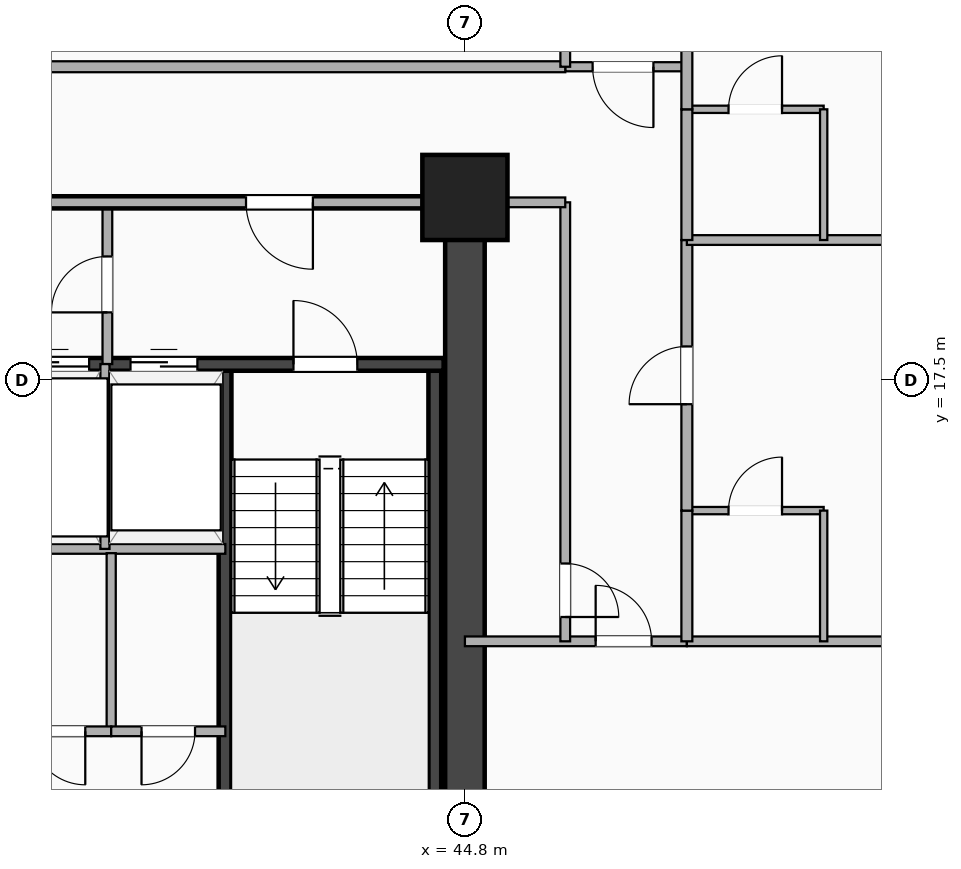
"""IFC4 building model, lengths in metres.
Left out: names, types, materials, properties, quantities, classifications, styles, units other than length and angle.
Written with IfcOpenShell. Run it as: python <this file> out.ifc"""

import sys

from ifc_helpers import new_model, si_unit, direction, frame, frame_2d, origin, origin_2d, place, context, subcontext, project, spatial, rectangle, extrude, element, fill, save


model = new_model("IFC4")
c1 = context("Model", 3, precision=1e-05, world=origin(), true_north=direction((0.0, 1.0)))
c2 = subcontext(c1, "Body", "Model", "MODEL_VIEW")
j1 = project(units=[si_unit("LENGTHUNIT", "METRE"), si_unit("PLANEANGLEUNIT", "RADIAN")], contexts=[c1])
p1 = place(None, origin())
s1 = spatial("IfcSite", under=j1, at=p1, CompositionType="ELEMENT")
p2 = place(p1, origin())
s2 = spatial("IfcBuilding", under=s1, at=p2, CompositionType="ELEMENT")
p3 = place(p2, frame((0.0, 0.0, 64.9)))
s3 = spatial("IfcBuildingStorey", under=s2, at=p3, CompositionType="ELEMENT", Elevation=64.9)
p4 = place(p3, frame((44.8, 3.5, 0.0), z_axis=(0.0, 0.0, 1.0), x_axis=(0.0, 1.0, 0.0)))
e1 = element("IfcWall", 1, at=p4, inside=s3, PredefinedType="SHEAR", context=c2, shape_type="SweptSolid", body=[
    extrude(rectangle(XDim=16.9, YDim=0.65, at=frame_2d((8.45, 0.0))), origin(), (0.0, 0.0, 1.0), 3.22),
])
for number, where, z_axis, x_axis in (
    (2, (40.855, 9.745, 0.0), (0.0, 0.0, 1.0), (0.0, 1.0, 0.0)),
    (3, (44.305, 9.745, 0.0), (0.0, 0.0, 1.0), (0.0, 1.0, 0.0)),
):
    element("IfcWall", number, at=place(p3, frame(where, z_axis=z_axis, x_axis=x_axis)), inside=s3, PredefinedType="SHEAR", context=c2, shape_type="SweptSolid", body=[
        extrude(rectangle(XDim=8.01, YDim=0.21, at=frame_2d((4.005, 0.0))), origin(), (0.0, 0.0, 1.0), 3.22),
    ])
p5 = place(p3, frame((37.25, 17.755, 0.0), z_axis=(0.0, 0.0, 1.0), x_axis=(1.0, 0.0, 0.0)))
e4 = element("IfcWall", 4, at=p5, inside=s3, PredefinedType="SHEAR", context=c2, shape_type="SweptSolid", body=[
    extrude(rectangle(XDim=7.2, YDim=0.21, at=frame_2d((3.6, 0.0))), origin(), (0.0, 0.0, 1.0), 3.22),
])
p6 = place(p5, frame((0.25, 0.0, 0.0)))
e5 = element("IfcOpeningElement", 5, at=p6, cuts=e4, PredefinedType="OPENING", context=c2, shape_type="SweptSolid", body=[
    extrude(rectangle(XDim=1.12, YDim=2.2, at=frame_2d((0.56, 1.1))), frame((0.0, 0.115, 0.0), z_axis=(0.0, -1.0, 0.0), x_axis=(1.0, 0.0, 0.0)), (0.0, 0.0, 1.0), 0.23),
])
p7 = place(p5, frame((2.05, 0.0, 0.0)))
e6 = element("IfcOpeningElement", 6, at=p7, cuts=e4, PredefinedType="OPENING", context=c2, shape_type="SweptSolid", body=[
    extrude(rectangle(XDim=1.1, YDim=2.18, at=frame_2d((0.55, 1.09))), frame((0.0, 0.115, 0.0), z_axis=(0.0, -1.0, 0.0), x_axis=(1.0, 0.0, 0.0)), (0.0, 0.0, 1.0), 0.23),
])
p8 = place(p5, frame((5.78, 0.0, 0.0), z_axis=(0.0, 0.0, 1.0), x_axis=(-1.0, 0.0, 0.0)))
e7 = element("IfcOpeningElement", 7, at=p8, cuts=e4, PredefinedType="OPENING", context=c2, shape_type="SweptSolid", body=[
    extrude(rectangle(XDim=1.05, YDim=2.15, at=frame_2d((0.525, 1.075))), frame((0.0, 0.115, 0.0), z_axis=(0.0, -1.0, 0.0), x_axis=(1.0, 0.0, 0.0)), (0.0, 0.0, 1.0), 0.23),
])
p9 = place(p3, frame((44.8, 20.5, -0.28), z_axis=(0.0, 0.0, 1.0), x_axis=(1.0, 0.0, 0.0)))
e8 = element("IfcColumn", 8, at=p9, inside=s3, PredefinedType="COLUMN", context=c2, shape_type="SweptSolid", body=[
    extrude(rectangle(XDim=1.4, YDim=1.4, at=origin_2d()), origin(), (0.0, 0.0, 1.0), 3.5),
])
p10 = place(p3, frame((38.92, 17.76, 0.0), z_axis=(0.0, 0.0, 1.0), x_axis=(0.0, 1.0, 0.0)))
e9 = element("IfcWall", 9, at=p10, inside=s3, PredefinedType="PARTITIONING", context=c2, shape_type="SweptSolid", body=[
    extrude(rectangle(XDim=2.66, YDim=0.16, at=frame_2d((1.33, 0.0))), origin(), (0.0, 0.0, 1.0), 2.51),
])
p11 = place(p10, frame((1.77, 0.0, 0.0), z_axis=(0.0, 0.0, 1.0), x_axis=(-1.0, 0.0, 0.0)))
e10 = element("IfcOpeningElement", 10, at=p11, cuts=e9, PredefinedType="OPENING", context=c2, shape_type="SweptSolid", body=[
    extrude(rectangle(XDim=0.92, YDim=2.08, at=frame_2d((0.46, 1.04))), frame((0.0, 0.09, 0.0), z_axis=(0.0, -1.0, 0.0), x_axis=(1.0, 0.0, 0.0)), (0.0, 0.0, 1.0), 0.18),
])
p12 = place(p3, frame((37.25, 14.72, 0.0), z_axis=(0.0, 0.0, 1.0), x_axis=(1.0, 0.0, 0.0)))
e11 = element("IfcWall", 11, at=p12, inside=s3, PredefinedType="PARTITIONING", context=c2, shape_type="SweptSolid", body=[
    extrude(rectangle(XDim=3.61, YDim=0.16, at=frame_2d((1.805, 0.0))), origin(), (0.0, 0.0, 1.0), 3.22),
])
p13 = place(p3, frame((38.88, 14.72, 0.0), z_axis=(0.0, 0.0, 1.0), x_axis=(0.0, 1.0, 0.0)))
e12 = element("IfcWall", 12, at=p13, inside=s3, PredefinedType="PARTITIONING", context=c2, shape_type="SweptSolid", body=[
    extrude(rectangle(XDim=3.04, YDim=0.15, at=frame_2d((1.52, 0.0))), origin(), (0.0, 0.0, 1.0), 3.22),
])
p14 = place(p3, frame((37.0, 20.42, 0.0), z_axis=(0.0, 0.0, 1.0), x_axis=(1.0, 0.0, 0.0)))
e13 = element("IfcWall", 13, at=p14, inside=s3, PredefinedType="PARTITIONING", context=c2, shape_type="SweptSolid", body=[
    extrude(rectangle(XDim=7.45, YDim=0.2, at=frame_2d((3.725, 0.0))), origin(), (0.0, 0.0, 1.0), 2.51),
])
p15 = place(p14, frame((4.2, 0.0, 0.0)))
e14 = element("IfcOpeningElement", 14, at=p15, cuts=e13, PredefinedType="OPENING", context=c2, shape_type="SweptSolid", body=[
    extrude(rectangle(XDim=1.1, YDim=2.15, at=frame_2d((0.55, 1.075))), frame((0.0, 0.11, 0.0), z_axis=(0.0, -1.0, 0.0), x_axis=(1.0, 0.0, 0.0)), (0.0, 0.0, 1.0), 0.22),
])
p16 = place(p3, frame((38.983, 11.72, 0.0), z_axis=(0.0, 0.0, 1.0), x_axis=(0.0, 1.0, 0.0)))
e15 = element("IfcWall", 15, at=p16, inside=s3, PredefinedType="PARTITIONING", context=c2, shape_type="SweptSolid", body=[
    extrude(rectangle(XDim=2.93, YDim=0.15, at=frame_2d((1.465, 0.0))), origin(), (0.0, 0.0, 1.0), 3.22),
])
p17 = place(p3, frame((37.25, 11.72, 0.0), z_axis=(0.0, 0.0, 1.0), x_axis=(1.0, 0.0, 0.0)))
e16 = element("IfcWall", 16, at=p17, inside=s3, PredefinedType="PARTITIONING", context=c2, shape_type="SweptSolid", body=[
    extrude(rectangle(XDim=1.733, YDim=0.16, at=frame_2d((0.866, 0.0))), origin(), (0.0, 0.0, 1.0), 3.22),
])
p18 = place(p17, frame((0.427, 0.0, 0.0)))
e17 = element("IfcOpeningElement", 17, at=p18, cuts=e16, PredefinedType="OPENING", context=c2, shape_type="SweptSolid", body=[
    extrude(rectangle(XDim=0.88, YDim=2.08, at=frame_2d((0.44, 1.04))), frame((0.0, 0.09, 0.0), z_axis=(0.0, -1.0, 0.0), x_axis=(1.0, 0.0, 0.0)), (0.0, 0.0, 1.0), 0.18),
])
p19 = place(p3, frame((38.983, 11.72, 0.0), z_axis=(0.0, 0.0, 1.0), x_axis=(1.0, 0.0, 0.0)))
e18 = element("IfcWall", 18, at=p19, inside=s3, PredefinedType="PARTITIONING", context=c2, shape_type="SweptSolid", body=[
    extrude(rectangle(XDim=1.877, YDim=0.16, at=frame_2d((0.938, 0.0))), origin(), (0.0, 0.0, 1.0), 3.22),
])
p20 = place(p19, frame((0.499, 0.0, 0.0)))
e19 = element("IfcOpeningElement", 19, at=p20, cuts=e18, PredefinedType="OPENING", context=c2, shape_type="SweptSolid", body=[
    extrude(rectangle(XDim=0.88, YDim=2.08, at=frame_2d((0.44, 1.04))), frame((0.0, 0.09, 0.0), z_axis=(0.0, -1.0, 0.0), x_axis=(1.0, 0.0, 0.0)), (0.0, 0.0, 1.0), 0.18),
])
p21 = place(p3, frame((44.8, 13.2, 0.0), z_axis=(0.0, 0.0, 1.0), x_axis=(1.0, 0.0, 0.0)))
e20 = element("IfcWall", 20, at=p21, inside=s3, PredefinedType="PARTITIONING", context=c2, shape_type="SweptSolid", body=[
    extrude(rectangle(XDim=3.65, YDim=0.16, at=frame_2d((1.825, 0.0))), origin(), (0.0, 0.0, 1.0), 2.51),
])
p22 = place(p21, frame((3.07, 0.0, 0.0), z_axis=(0.0, 0.0, 1.0), x_axis=(-1.0, 0.0, 0.0)))
e21 = element("IfcOpeningElement", 21, at=p22, cuts=e20, PredefinedType="OPENING", context=c2, shape_type="SweptSolid", body=[
    extrude(rectangle(XDim=0.92, YDim=2.08, at=frame_2d((0.46, 1.04))), frame((0.0, 0.09, 0.0), z_axis=(0.0, -1.0, 0.0), x_axis=(1.0, 0.0, 0.0)), (0.0, 0.0, 1.0), 0.18),
])
p23 = place(p3, frame((46.45, 13.2, 0.0), z_axis=(0.0, 0.0, 1.0), x_axis=(0.0, 1.0, 0.0)))
e22 = element("IfcWall", 22, at=p23, inside=s3, PredefinedType="PARTITIONING", context=c2, shape_type="SweptSolid", body=[
    extrude(rectangle(XDim=7.22, YDim=0.16, at=frame_2d((3.61, 0.0))), origin(), (0.0, 0.0, 1.0), 2.51),
])
p24 = place(p23, frame((0.4, 0.0, 0.0)))
e23 = element("IfcOpeningElement", 23, at=p24, cuts=e22, PredefinedType="OPENING", context=c2, shape_type="SweptSolid", body=[
    extrude(rectangle(XDim=0.88, YDim=2.08, at=frame_2d((0.44, 1.04))), frame((0.0, 0.09, 0.0), z_axis=(0.0, -1.0, 0.0), x_axis=(1.0, 0.0, 0.0)), (0.0, 0.0, 1.0), 0.18),
])
p25 = place(p3, frame((44.8, 20.42, 0.0), z_axis=(0.0, 0.0, 1.0), x_axis=(1.0, 0.0, 0.0)))
e24 = element("IfcWall", 24, at=p25, inside=s3, PredefinedType="PARTITIONING", context=c2, shape_type="SweptSolid", body=[
    extrude(rectangle(XDim=1.65, YDim=0.16, at=frame_2d((0.825, 0.0))), origin(), (0.0, 0.0, 1.0), 2.51),
])
p26 = place(p3, frame((46.45, 22.65, 0.0), z_axis=(0.0, 0.0, 1.0), x_axis=(1.0, 0.0, 0.0)))
e25 = element("IfcWall", 25, at=p26, inside=s3, PredefinedType="PARTITIONING", context=c2, shape_type="SweptSolid", body=[
    extrude(rectangle(XDim=2.0, YDim=0.15, at=frame_2d((1.0, 0.0))), origin(), (0.0, 0.0, 1.0), 3.22),
])
p27 = place(p26, frame((0.45, 0.0, 0.0)))
e26 = element("IfcOpeningElement", 26, at=p27, cuts=e25, PredefinedType="OPENING", context=c2, shape_type="SweptSolid", body=[
    extrude(rectangle(XDim=1.0, YDim=2.15, at=frame_2d((0.5, 1.075))), frame((0.0, 0.085, 0.0), z_axis=(0.0, -1.0, 0.0), x_axis=(1.0, 0.0, 0.0)), (0.0, 0.0, 1.0), 0.17),
])
p28 = place(p3, frame((24.1, 22.65, 0.0), z_axis=(0.0, 0.0, 1.0), x_axis=(1.0, 0.0, 0.0)))
e27 = element("IfcWall", 27, at=p28, inside=s3, PredefinedType="PARTITIONING", context=c2, shape_type="SweptSolid", body=[
    extrude(rectangle(XDim=22.35, YDim=0.18, at=frame_2d((11.175, 0.0))), origin(), (0.0, 0.0, 1.0), 2.51),
])
p29 = place(p28, frame((10.7, 0.0, 0.0)))
e28 = element("IfcOpeningElement", 28, at=p29, cuts=e27, PredefinedType="OPENING", context=c2, shape_type="SweptSolid", body=[
    extrude(rectangle(XDim=0.95, YDim=2.15, at=frame_2d((0.475, 1.075))), frame((0.0, 0.1, 0.0), z_axis=(0.0, -1.0, 0.0), x_axis=(1.0, 0.0, 0.0)), (0.0, 0.0, 1.0), 0.2),
])
p30 = place(p3, frame((46.45, 22.65, 0.0), z_axis=(0.0, 0.0, 1.0), x_axis=(0.0, 1.0, 0.0)))
e29 = element("IfcWall", 29, at=p30, inside=s3, PredefinedType="PARTITIONING", context=c2, shape_type="SweptSolid", body=[
    extrude(rectangle(XDim=10.35, YDim=0.16, at=frame_2d((5.175, 0.0))), origin(), (0.0, 0.0, 1.0), 2.51),
])
p31 = place(p3, frame((48.45, 13.2, 0.0), z_axis=(0.0, 0.0, 1.0), x_axis=(1.0, 0.0, 0.0)))
e30 = element("IfcWall", 30, at=p31, inside=s3, PredefinedType="PARTITIONING", context=c2, shape_type="SweptSolid", body=[
    extrude(rectangle(XDim=13.23, YDim=0.16, at=frame_2d((6.615, 0.0))), origin(), (0.0, 0.0, 1.0), 2.583),
])
p32 = place(p3, frame((48.45, 15.35, 0.0), z_axis=(0.0, 0.0, 1.0), x_axis=(1.0, 0.0, 0.0)))
e31 = element("IfcWall", 31, at=p32, inside=s3, PredefinedType="PARTITIONING", context=c2, shape_type="SweptSolid", body=[
    extrude(rectangle(XDim=2.25, YDim=0.12, at=frame_2d((1.125, 0.0))), origin(), (0.0, 0.0, 1.0), 3.22),
])
p33 = place(p32, frame((1.565, 0.0, 0.0), z_axis=(0.0, 0.0, 1.0), x_axis=(-1.0, 0.0, 0.0)))
e32 = element("IfcOpeningElement", 32, at=p33, cuts=e31, PredefinedType="OPENING", context=c2, shape_type="SweptSolid", body=[
    extrude(rectangle(XDim=0.88, YDim=2.08, at=frame_2d((0.44, 1.04))), frame((0.0, 0.07, 0.0), z_axis=(0.0, -1.0, 0.0), x_axis=(1.0, 0.0, 0.0)), (0.0, 0.0, 1.0), 0.14),
])
p34 = place(p3, frame((50.7, 13.2, 0.0), z_axis=(0.0, 0.0, 1.0), x_axis=(0.0, 1.0, 0.0)))
e33 = element("IfcWall", 33, at=p34, inside=s3, PredefinedType="PARTITIONING", context=c2, shape_type="SweptSolid", body=[
    extrude(rectangle(XDim=2.15, YDim=0.12, at=frame_2d((1.075, 0.0))), origin(), (0.0, 0.0, 1.0), 2.902),
])
p35 = place(p3, frame((48.45, 13.2, 0.0), z_axis=(0.0, 0.0, 1.0), x_axis=(0.0, 1.0, 0.0)))
e34 = element("IfcWall", 34, at=p35, inside=s3, PredefinedType="PARTITIONING", context=c2, shape_type="SweptSolid", body=[
    extrude(rectangle(XDim=2.15, YDim=0.18, at=frame_2d((1.075, 0.0))), origin(), (0.0, 0.0, 1.0), 2.902),
])
p36 = place(p3, frame((48.45, 15.35, 0.0), z_axis=(0.0, 0.0, 1.0), x_axis=(0.0, 1.0, 0.0)))
e35 = element("IfcWall", 35, at=p36, inside=s3, PredefinedType="PARTITIONING", context=c2, shape_type="SweptSolid", body=[
    extrude(rectangle(XDim=4.45, YDim=0.18, at=frame_2d((2.225, 0.0))), origin(), (0.0, 0.0, 1.0), 2.902),
])
p37 = place(p36, frame((2.7, 0.0, 0.0), z_axis=(0.0, 0.0, 1.0), x_axis=(-1.0, 0.0, 0.0)))
e36 = element("IfcOpeningElement", 36, at=p37, cuts=e35, PredefinedType="OPENING", context=c2, shape_type="SweptSolid", body=[
    extrude(rectangle(XDim=0.95, YDim=2.15, at=frame_2d((0.475, 1.075))), frame((0.0, 0.1, 0.0), z_axis=(0.0, -1.0, 0.0), x_axis=(1.0, 0.0, 0.0)), (0.0, 0.0, 1.0), 0.2),
])
p38 = place(p3, frame((48.45, 19.8, 0.0), z_axis=(0.0, 0.0, 1.0), x_axis=(1.0, 0.0, 0.0)))
e37 = element("IfcWall", 37, at=p38, inside=s3, PredefinedType="PARTITIONING", context=c2, shape_type="SweptSolid", body=[
    extrude(rectangle(XDim=13.23, YDim=0.16, at=frame_2d((6.615, 0.0))), origin(), (0.0, 0.0, 1.0), 2.583),
])
p39 = place(p3, frame((48.45, 21.95, 0.0), z_axis=(0.0, 0.0, 1.0), x_axis=(1.0, 0.0, 0.0)))
e38 = element("IfcWall", 38, at=p39, inside=s3, PredefinedType="PARTITIONING", context=c2, shape_type="SweptSolid", body=[
    extrude(rectangle(XDim=2.25, YDim=0.12, at=frame_2d((1.125, 0.0))), origin(), (0.0, 0.0, 1.0), 3.22),
])
p40 = place(p39, frame((1.565, 0.0, 0.0), z_axis=(0.0, 0.0, 1.0), x_axis=(-1.0, 0.0, 0.0)))
e39 = element("IfcOpeningElement", 39, at=p40, cuts=e38, PredefinedType="OPENING", context=c2, shape_type="SweptSolid", body=[
    extrude(rectangle(XDim=0.88, YDim=2.08, at=frame_2d((0.44, 1.04))), frame((0.0, 0.07, 0.0), z_axis=(0.0, -1.0, 0.0), x_axis=(1.0, 0.0, 0.0)), (0.0, 0.0, 1.0), 0.14),
])
p41 = place(p3, frame((50.7, 19.8, 0.0), z_axis=(0.0, 0.0, 1.0), x_axis=(0.0, 1.0, 0.0)))
e40 = element("IfcWall", 40, at=p41, inside=s3, PredefinedType="PARTITIONING", context=c2, shape_type="SweptSolid", body=[
    extrude(rectangle(XDim=2.15, YDim=0.12, at=frame_2d((1.075, 0.0))), origin(), (0.0, 0.0, 1.0), 2.51),
])
p42 = place(p3, frame((48.45, 19.8, 0.0), z_axis=(0.0, 0.0, 1.0), x_axis=(0.0, 1.0, 0.0)))
e41 = element("IfcWall", 41, at=p42, inside=s3, PredefinedType="PARTITIONING", context=c2, shape_type="SweptSolid", body=[
    extrude(rectangle(XDim=2.15, YDim=0.18, at=frame_2d((1.075, 0.0))), origin(), (0.0, 0.0, 1.0), 2.51),
])
p43 = place(p3, frame((48.45, 21.95, 0.0), z_axis=(0.0, 0.0, 1.0), x_axis=(0.0, 1.0, 0.0)))
e42 = element("IfcWall", 42, at=p43, inside=s3, PredefinedType="PARTITIONING", context=c2, shape_type="SweptSolid", body=[
    extrude(rectangle(XDim=4.45, YDim=0.18, at=frame_2d((2.225, 0.0))), origin(), (0.0, 0.0, 1.0), 2.788),
])
p44 = place(p43, frame((2.7, 0.0, 0.0), z_axis=(0.0, 0.0, 1.0), x_axis=(-1.0, 0.0, 0.0)))
e43 = element("IfcOpeningElement", 43, at=p44, cuts=e42, PredefinedType="OPENING", context=c2, shape_type="SweptSolid", body=[
    extrude(rectangle(XDim=0.95, YDim=2.15, at=frame_2d((0.475, 1.075))), frame((0.0, 0.1, 0.0), z_axis=(0.0, -1.0, 0.0), x_axis=(1.0, 0.0, 0.0)), (0.0, 0.0, 1.0), 0.2),
])
p45 = place(p6, origin())
e44 = element("IfcDoor", 44, at=p45, inside=s3, OperationType="DOUBLE_DOOR_SLIDING", PredefinedType="DOOR", context=c2, shape_type="SweptSolid", body=[
    extrude(rectangle(XDim=1.12, YDim=2.2, at=frame_2d((0.56, 1.1))), frame((0.0, 0.025, 0.0), z_axis=(0.0, -1.0, 0.0), x_axis=(1.0, 0.0, 0.0)), (0.0, 0.0, 1.0), 0.05),
])
fill(e5, e44)
p46 = place(p7, origin())
e45 = element("IfcDoor", 45, at=p46, inside=s3, OperationType="DOUBLE_DOOR_SLIDING", PredefinedType="DOOR", context=c2, shape_type="SweptSolid", body=[
    extrude(rectangle(XDim=1.1, YDim=2.18, at=frame_2d((0.55, 1.09))), frame((0.0, 0.025, 0.0), z_axis=(0.0, -1.0, 0.0), x_axis=(1.0, 0.0, 0.0)), (0.0, 0.0, 1.0), 0.05),
])
fill(e6, e45)
p47 = place(p8, origin())
e46 = element("IfcDoor", 46, at=p47, inside=s3, OperationType="SINGLE_SWING_LEFT", PredefinedType="DOOR", context=c2, shape_type="SweptSolid", body=[
    extrude(rectangle(XDim=1.05, YDim=2.15, at=frame_2d((0.525, 1.075))), frame((0.0, 0.025, 0.0), z_axis=(0.0, -1.0, 0.0), x_axis=(1.0, 0.0, 0.0)), (0.0, 0.0, 1.0), 0.05),
])
fill(e7, e46)
p48 = place(p11, origin())
e47 = element("IfcDoor", 47, at=p48, inside=s3, OperationType="SINGLE_SWING_LEFT", PredefinedType="DOOR", context=c2, shape_type="SweptSolid", body=[
    extrude(rectangle(XDim=0.92, YDim=2.08, at=frame_2d((0.46, 1.04))), frame((0.0, 0.025, 0.0), z_axis=(0.0, -1.0, 0.0), x_axis=(1.0, 0.0, 0.0)), (0.0, 0.0, 1.0), 0.05),
])
fill(e10, e47)
p49 = place(p15, origin())
e48 = element("IfcDoor", 48, at=p49, inside=s3, OperationType="SINGLE_SWING_RIGHT", PredefinedType="DOOR", context=c2, shape_type="SweptSolid", body=[
    extrude(rectangle(XDim=1.1, YDim=2.15, at=frame_2d((0.55, 1.075))), frame((0.0, 0.025, 0.0), z_axis=(0.0, -1.0, 0.0), x_axis=(1.0, 0.0, 0.0)), (0.0, 0.0, 1.0), 0.05),
])
fill(e14, e48)
p50 = place(p18, origin())
e49 = element("IfcDoor", 49, at=p50, inside=s3, OperationType="SINGLE_SWING_RIGHT", PredefinedType="DOOR", context=c2, shape_type="SweptSolid", body=[
    extrude(rectangle(XDim=0.88, YDim=2.08, at=frame_2d((0.44, 1.04))), frame((0.0, 0.025, 0.0), z_axis=(0.0, -1.0, 0.0), x_axis=(1.0, 0.0, 0.0)), (0.0, 0.0, 1.0), 0.05),
])
fill(e17, e49)
p51 = place(p20, origin())
e50 = element("IfcDoor", 50, at=p51, inside=s3, OperationType="SINGLE_SWING_LEFT", PredefinedType="DOOR", context=c2, shape_type="SweptSolid", body=[
    extrude(rectangle(XDim=0.88, YDim=2.08, at=frame_2d((0.44, 1.04))), frame((0.0, 0.025, 0.0), z_axis=(0.0, -1.0, 0.0), x_axis=(1.0, 0.0, 0.0)), (0.0, 0.0, 1.0), 0.05),
])
fill(e19, e50)
p52 = place(p22, origin())
e51 = element("IfcDoor", 51, at=p52, inside=s3, OperationType="SINGLE_SWING_LEFT", PredefinedType="DOOR", context=c2, shape_type="SweptSolid", body=[
    extrude(rectangle(XDim=0.92, YDim=2.08, at=frame_2d((0.46, 1.04))), frame((0.0, 0.025, 0.0), z_axis=(0.0, -1.0, 0.0), x_axis=(1.0, 0.0, 0.0)), (0.0, 0.0, 1.0), 0.05),
])
fill(e21, e51)
p53 = place(p24, origin())
e52 = element("IfcDoor", 52, at=p53, inside=s3, OperationType="SINGLE_SWING_LEFT", PredefinedType="DOOR", context=c2, shape_type="SweptSolid", body=[
    extrude(rectangle(XDim=0.88, YDim=2.08, at=frame_2d((0.44, 1.04))), frame((0.0, 0.025, 0.0), z_axis=(0.0, -1.0, 0.0), x_axis=(1.0, 0.0, 0.0)), (0.0, 0.0, 1.0), 0.05),
])
fill(e23, e52)
p54 = place(p27, origin())
e53 = element("IfcDoor", 53, at=p54, inside=s3, OperationType="SINGLE_SWING_RIGHT", PredefinedType="DOOR", context=c2, shape_type="SweptSolid", body=[
    extrude(rectangle(XDim=1.0, YDim=2.15, at=frame_2d((0.5, 1.075))), frame((0.0, 0.025, 0.0), z_axis=(0.0, -1.0, 0.0), x_axis=(1.0, 0.0, 0.0)), (0.0, 0.0, 1.0), 0.05),
])
fill(e26, e53)
p55 = place(p33, origin())
e54 = element("IfcDoor", 54, at=p55, inside=s3, OperationType="SINGLE_SWING_RIGHT", PredefinedType="DOOR", context=c2, shape_type="SweptSolid", body=[
    extrude(rectangle(XDim=0.88, YDim=2.08, at=frame_2d((0.44, 1.04))), frame((0.0, 0.025, 0.0), z_axis=(0.0, -1.0, 0.0), x_axis=(1.0, 0.0, 0.0)), (0.0, 0.0, 1.0), 0.05),
])
fill(e32, e54)
p56 = place(p37, origin())
e55 = element("IfcDoor", 55, at=p56, inside=s3, OperationType="SINGLE_SWING_LEFT", PredefinedType="DOOR", context=c2, shape_type="SweptSolid", body=[
    extrude(rectangle(XDim=0.95, YDim=2.15, at=frame_2d((0.475, 1.075))), frame((0.0, 0.025, 0.0), z_axis=(0.0, -1.0, 0.0), x_axis=(1.0, 0.0, 0.0)), (0.0, 0.0, 1.0), 0.05),
])
fill(e36, e55)
p57 = place(p40, origin())
e56 = element("IfcDoor", 56, at=p57, inside=s3, OperationType="SINGLE_SWING_RIGHT", PredefinedType="DOOR", context=c2, shape_type="SweptSolid", body=[
    extrude(rectangle(XDim=0.88, YDim=2.08, at=frame_2d((0.44, 1.04))), frame((0.0, 0.025, 0.0), z_axis=(0.0, -1.0, 0.0), x_axis=(1.0, 0.0, 0.0)), (0.0, 0.0, 1.0), 0.05),
])
fill(e39, e56)
save(model, sys.argv[1])
